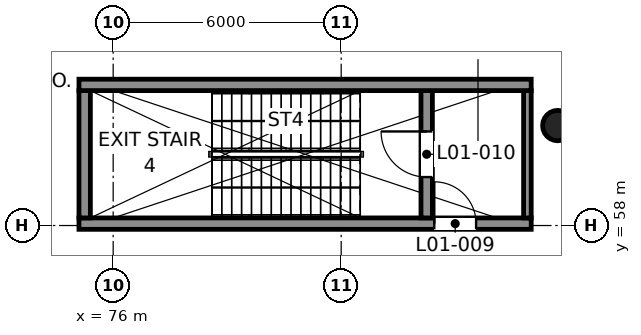
"""IFC4 building model, lengths in metres.
Left out: names, types, materials, properties, quantities, classifications, styles, units other than length and angle.
Written with IfcOpenShell. Run it as: python <this file> out.ifc"""

import sys

from ifc_helpers import new_model, si_unit, direction, frame, frame_2d, origin, origin_2d, place, context, subcontext, project, spatial, rectangle, circle, extrude, element, fill, save


model = new_model("IFC4")
c1 = context("Model", 3, precision=1e-05, world=origin(), true_north=direction((0.0, 1.0)))
c2 = subcontext(c1, "Body", "Model", "MODEL_VIEW")
j1 = project(units=[si_unit("LENGTHUNIT", "METRE"), si_unit("PLANEANGLEUNIT", "RADIAN")], contexts=[c1])
p1 = place(None, origin())
s1 = spatial("IfcSite", under=j1, at=p1, CompositionType="ELEMENT")
p2 = place(p1, origin())
s2 = spatial("IfcBuilding", under=s1, at=p2, CompositionType="ELEMENT")
p3 = place(p2, frame((0.0, 0.0, 9.0)))
s3 = spatial("IfcBuildingStorey", under=s2, at=p3, CompositionType="ELEMENT", Elevation=9.0)
p4 = place(p3, frame((87.7, 60.63, 0.0), z_axis=(0.0, 0.0, 1.0), x_axis=(1.0, 0.0, 0.0)))
e1 = element("IfcColumn", 1, at=p4, inside=s3, PredefinedType="COLUMN", context=c2, shape_type="SweptSolid", body=[
    extrude(circle(Radius=0.4, at=origin_2d()), origin(), (0.0, 0.0, 1.0), 6.0),
])
p5 = place(p3, frame((75.1, 58.05, 0.0), z_axis=(0.0, 0.0, 1.0), x_axis=(1.0, 0.0, 0.0)))
e2 = element("IfcWall", 2, at=p5, inside=s3, PredefinedType="SHEAR", context=c2, shape_type="SweptSolid", body=[
    extrude(rectangle(XDim=11.9, YDim=0.3, at=frame_2d((5.95, 0.0))), origin(), (0.0, 0.0, 1.0), 6.0),
])
p6 = place(p5, frame((9.35, 0.0, 0.0)))
e3 = element("IfcOpeningElement", 3, at=p6, cuts=e2, PredefinedType="OPENING", context=c2, shape_type="SweptSolid", body=[
    extrude(rectangle(XDim=1.1, YDim=2.1, at=frame_2d((0.55, 1.05))), frame((0.0, 0.16, 0.0), z_axis=(0.0, -1.0, 0.0), x_axis=(1.0, 0.0, 0.0)), (0.0, 0.0, 1.0), 0.32),
])
p7 = place(p3, frame((75.25, 58.2, 0.0), z_axis=(0.0, 0.0, 1.0), x_axis=(0.0, 1.0, 0.0)))
e4 = element("IfcWall", 4, at=p7, inside=s3, PredefinedType="SHEAR", context=c2, shape_type="SweptSolid", body=[
    extrude(rectangle(XDim=3.35, YDim=0.3, at=frame_2d((1.675, 0.0))), origin(), (0.0, 0.0, 1.0), 6.0),
])
p8 = place(p3, frame((84.25, 58.2, 0.0), z_axis=(0.0, 0.0, 1.0), x_axis=(0.0, 1.0, 0.0)))
e5 = element("IfcWall", 5, at=p8, inside=s3, PredefinedType="SHEAR", context=c2, shape_type="SweptSolid", body=[
    extrude(rectangle(XDim=3.35, YDim=0.3, at=frame_2d((1.675, 0.0))), origin(), (0.0, 0.0, 1.0), 6.0),
])
p9 = place(p8, frame((1.075, 0.0, 0.0)))
e6 = element("IfcOpeningElement", 6, at=p9, cuts=e5, PredefinedType="OPENING", context=c2, shape_type="SweptSolid", body=[
    extrude(rectangle(XDim=1.2, YDim=2.1, at=frame_2d((0.6, 1.05))), frame((0.0, 0.16, 0.0), z_axis=(0.0, -1.0, 0.0), x_axis=(1.0, 0.0, 0.0)), (0.0, 0.0, 1.0), 0.32),
])
p10 = place(p3, frame((86.9, 58.2, 0.0), z_axis=(0.0, 0.0, 1.0), x_axis=(0.0, 1.0, 0.0)))
e7 = element("IfcWall", 7, at=p10, inside=s3, PredefinedType="SHEAR", context=c2, shape_type="SweptSolid", body=[
    extrude(rectangle(XDim=3.35, YDim=0.2, at=frame_2d((1.675, 0.0))), origin(), (0.0, 0.0, 1.0), 6.0),
])
p11 = place(p3, frame((75.1, 61.7, 0.0), z_axis=(0.0, 0.0, 1.0), x_axis=(1.0, 0.0, 0.0)))
e8 = element("IfcWall", 8, at=p11, inside=s3, PredefinedType="SHEAR", context=c2, shape_type="SweptSolid", body=[
    extrude(rectangle(XDim=11.9, YDim=0.3, at=frame_2d((5.95, 0.0))), origin(), (0.0, 0.0, 1.0), 6.0),
])
p12 = place(p6, origin())
e9 = element("IfcDoor", 9, at=p12, inside=s3, OperationType="SINGLE_SWING_LEFT", PredefinedType="DOOR", context=c2, shape_type="SweptSolid", body=[
    extrude(rectangle(XDim=1.1, YDim=2.1, at=frame_2d((0.55, 1.05))), frame((0.0, 0.025, 0.0), z_axis=(0.0, -1.0, 0.0), x_axis=(1.0, 0.0, 0.0)), (0.0, 0.0, 1.0), 0.05),
])
fill(e3, e9)
p13 = place(p9, origin())
e10 = element("IfcDoor", 10, at=p13, inside=s3, OperationType="SINGLE_SWING_RIGHT", PredefinedType="DOOR", context=c2, shape_type="SweptSolid", body=[
    extrude(rectangle(XDim=1.2, YDim=2.1, at=frame_2d((0.6, 1.05))), frame((0.0, 0.025, 0.0), z_axis=(0.0, -1.0, 0.0), x_axis=(1.0, 0.0, 0.0)), (0.0, 0.0, 1.0), 0.05),
])
fill(e6, e10)
save(model, sys.argv[1])
